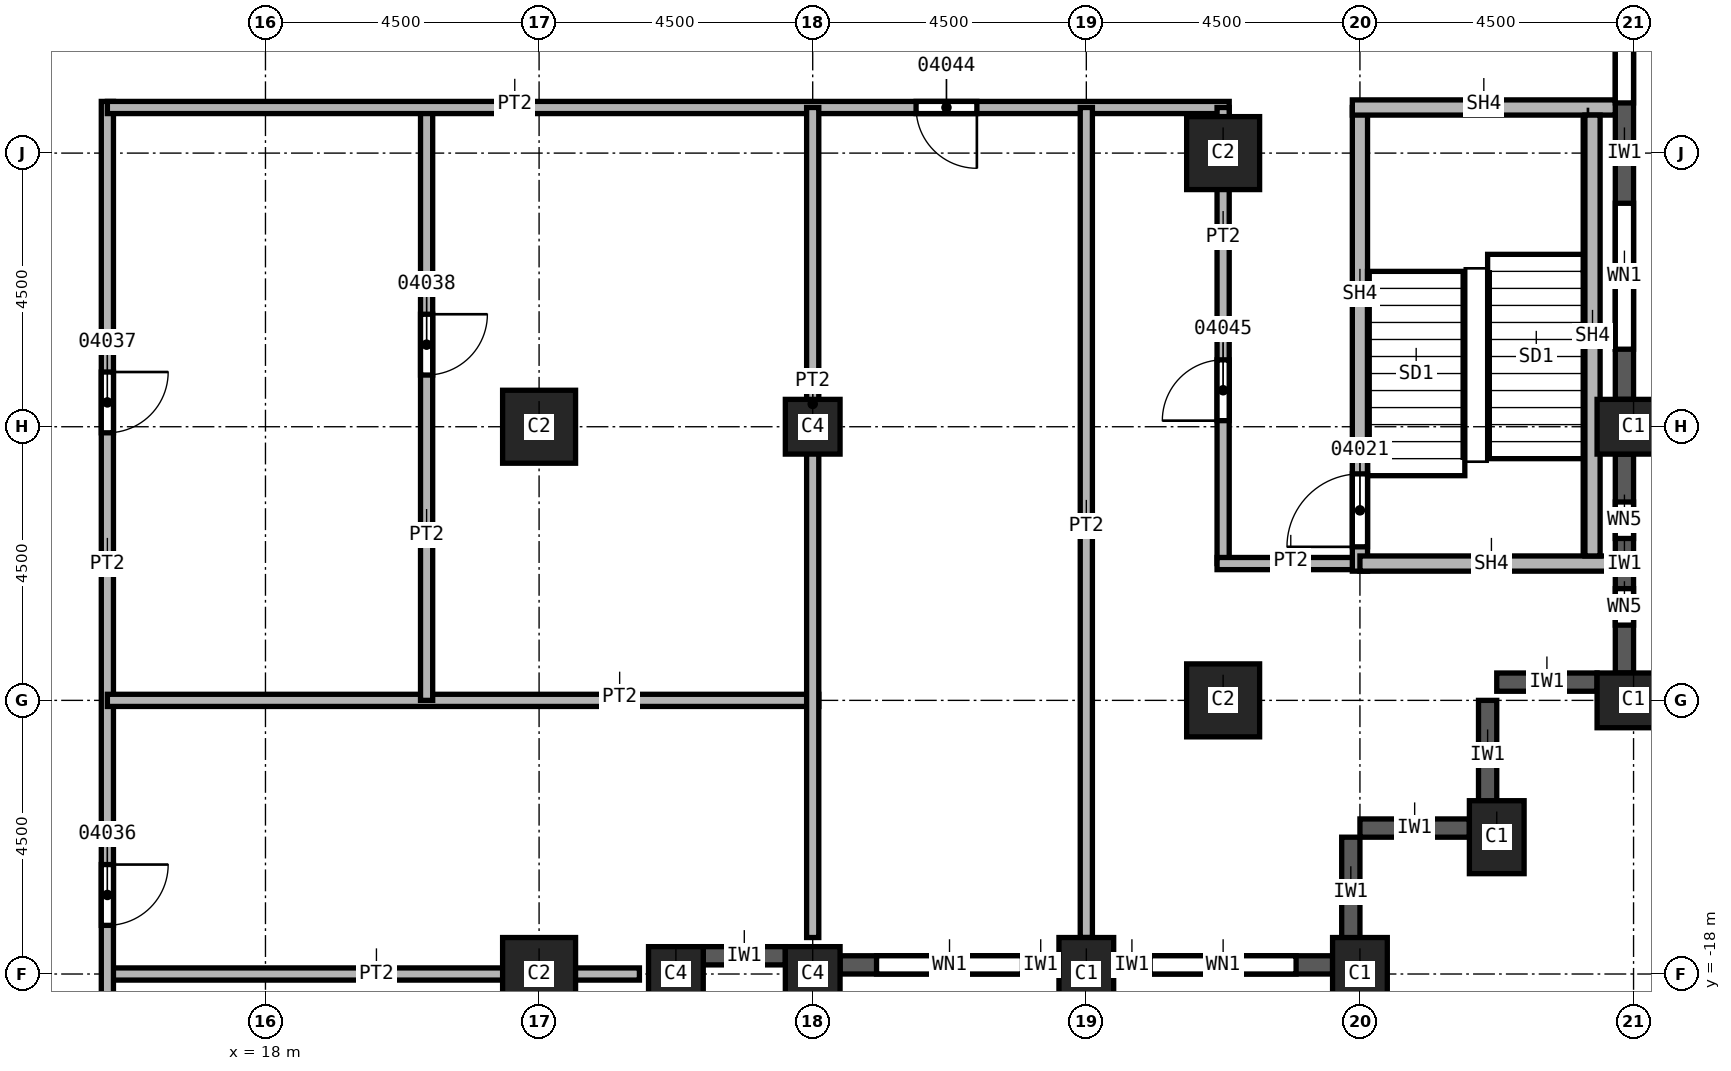
"""IFC4 building model, lengths in metres.
Left out: names, types, materials, properties, quantities, classifications, styles, units other than length and angle.
Written with IfcOpenShell. Run it as: python <this file> out.ifc"""

import sys

from ifc_helpers import new_model, si_unit, direction, frame, frame_2d, origin, origin_2d, place, context, subcontext, project, spatial, rectangle, extrude, element, fill, save


model = new_model("IFC4")
c1 = context("Model", 3, precision=1e-05, world=origin(), true_north=direction((0.0, 1.0)))
c2 = subcontext(c1, "Body", "Model", "MODEL_VIEW")
j1 = project(units=[si_unit("LENGTHUNIT", "METRE"), si_unit("PLANEANGLEUNIT", "RADIAN")], contexts=[c1])
p1 = place(None, origin())
s1 = spatial("IfcSite", under=j1, at=p1, CompositionType="ELEMENT")
p2 = place(p1, origin())
s2 = spatial("IfcBuilding", under=s1, at=p2, CompositionType="ELEMENT")
p3 = place(p2, frame((0.0, 0.0, 104.0)))
s3 = spatial("IfcBuildingStorey", under=s2, at=p3, CompositionType="ELEMENT", Elevation=104.0)
for number, where, z_axis, x_axis in (
    (1, (40.5, -9.0, 0.0), (0.0, 0.0, 1.0), (0.0, 1.0, 0.0)),
    (2, (40.5, -13.5, 0.0), (0.0, 0.0, 1.0), (0.0, 1.0, 0.0)),
    (3, (38.25, -15.75, 0.0), (0.0, 0.0, 1.0), (1.0, 0.0, 0.0)),
    (4, (31.5, -18.0, 0.0), (0.0, 0.0, 1.0), (1.0, 0.0, 0.0)),
    (5, (36.0, -18.0, 0.0), (0.0, 0.0, 1.0), (1.0, 0.0, 0.0)),
):
    element("IfcColumn", number, at=place(p3, frame(where, z_axis=z_axis, x_axis=x_axis)), inside=s3, PredefinedType="COLUMN", context=c2, shape_type="SweptSolid", body=[
        extrude(rectangle(XDim=0.9, YDim=1.2, at=origin_2d()), origin(), (0.0, 0.0, 1.0), 3.7),
    ])
for number, where, z_axis, x_axis in (
    (6, (33.75, -4.5, 0.0), (0.0, 0.0, 1.0), (1.0, 0.0, 0.0)),
    (7, (33.75, -13.5, 0.0), (0.0, 0.0, 1.0), (1.0, 0.0, 0.0)),
    (8, (22.5, -9.0, 0.0), (0.0, 0.0, 1.0), (1.0, 0.0, 0.0)),
    (9, (22.5, -18.0, 0.0), (0.0, 0.0, 1.0), (1.0, 0.0, 0.0)),
):
    element("IfcColumn", number, at=place(p3, frame(where, z_axis=z_axis, x_axis=x_axis)), inside=s3, PredefinedType="COLUMN", context=c2, shape_type="SweptSolid", body=[
        extrude(rectangle(XDim=1.2, YDim=1.2, at=origin_2d()), origin(), (0.0, 0.0, 1.0), 3.7),
    ])
for number, where, z_axis, x_axis in (
    (10, (27.0, -9.0, 0.0), (0.0, 0.0, 1.0), (1.0, 0.0, 0.0)),
    (11, (27.0, -18.0, 0.0), (0.0, 0.0, 1.0), (1.0, 0.0, 0.0)),
    (12, (24.75, -18.0, 0.0), (0.0, 0.0, 1.0), (1.0, 0.0, 0.0)),
):
    element("IfcColumn", number, at=place(p3, frame(where, z_axis=z_axis, x_axis=x_axis)), inside=s3, PredefinedType="COLUMN", context=c2, shape_type="SweptSolid", body=[
        extrude(rectangle(XDim=0.9, YDim=0.9, at=origin_2d()), origin(), (0.0, 0.0, 1.0), 3.7),
    ])
for number, where, z_axis, x_axis in (
    (13, (35.85, -17.55, 0.0), (0.0, 0.0, 1.0), (0.0, 1.0, 0.0)),
    (14, (37.8, -15.6, 0.0), (0.0, 0.0, 1.0), (-1.0, 0.0, 0.0)),
    (15, (38.1, -15.3, 0.0), (0.0, 0.0, 1.0), (0.0, 1.0, 0.0)),
):
    element("IfcWall", number, at=place(p3, frame(where, z_axis=z_axis, x_axis=x_axis)), inside=s3, PredefinedType="SOLIDWALL", context=c2, shape_type="SweptSolid", body=[
        extrude(rectangle(XDim=1.8, YDim=0.3, at=frame_2d((0.9, 0.0))), origin(), (0.0, 0.0, 1.0), 3.1),
    ])
p4 = place(p3, frame((39.9, -13.2, 0.0), z_axis=(0.0, 0.0, 1.0), x_axis=(-1.0, 0.0, 0.0)))
e16 = element("IfcWall", 16, at=p4, inside=s3, PredefinedType="SOLIDWALL", context=c2, shape_type="SweptSolid", body=[
    extrude(rectangle(XDim=1.65, YDim=0.3, at=frame_2d((0.825, 0.0))), origin(), (0.0, 0.0, 1.0), 3.1),
])
p5 = place(p3, frame((25.2, -17.7, 0.0), z_axis=(0.0, 0.0, 1.0), x_axis=(1.0, 0.0, 0.0)))
e17 = element("IfcWall", 17, at=p5, inside=s3, PredefinedType="SOLIDWALL", context=c2, shape_type="SweptSolid", body=[
    extrude(rectangle(XDim=1.35, YDim=0.3, at=frame_2d((0.675, 0.0))), origin(), (0.0, 0.0, 1.0), 3.1),
])
p6 = place(p3, frame((27.45, -17.85, 0.0), z_axis=(0.0, 0.0, 1.0), x_axis=(1.0, 0.0, 0.0)))
e18 = element("IfcWall", 18, at=p6, inside=s3, PredefinedType="SOLIDWALL", context=c2, shape_type="SweptSolid", body=[
    extrude(rectangle(XDim=3.6, YDim=0.3, at=frame_2d((1.8, 0.0))), origin(), (0.0, 0.0, 1.0), 3.1),
])
p7 = place(p6, frame((0.6, 0.0, 0.8)))
e19 = element("IfcOpeningElement", 19, at=p7, cuts=e18, PredefinedType="OPENING", context=c2, shape_type="SweptSolid", body=[
    extrude(rectangle(XDim=2.4, YDim=1.95, at=frame_2d((1.2, 0.975))), frame((0.0, 0.15, 0.0), z_axis=(0.0, -1.0, 0.0), x_axis=(1.0, 0.0, 0.0)), (0.0, 0.0, 1.0), 0.3),
])
p8 = place(p3, frame((31.95, -17.85, 0.0), z_axis=(0.0, 0.0, 1.0), x_axis=(1.0, 0.0, 0.0)))
e20 = element("IfcWall", 20, at=p8, inside=s3, PredefinedType="SOLIDWALL", context=c2, shape_type="SweptSolid", body=[
    extrude(rectangle(XDim=3.6, YDim=0.3, at=frame_2d((1.8, 0.0))), origin(), (0.0, 0.0, 1.0), 3.1),
])
p9 = place(p8, frame((0.6, 0.0, 0.8)))
e21 = element("IfcOpeningElement", 21, at=p9, cuts=e20, PredefinedType="OPENING", context=c2, shape_type="SweptSolid", body=[
    extrude(rectangle(XDim=2.4, YDim=1.95, at=frame_2d((1.2, 0.975))), frame((0.0, 0.15, 0.0), z_axis=(0.0, -1.0, 0.0), x_axis=(1.0, 0.0, 0.0)), (0.0, 0.0, 1.0), 0.3),
])
p10 = place(p3, frame((40.35, -13.05, 0.0), z_axis=(0.0, 0.0, 1.0), x_axis=(0.0, 1.0, 0.0)))
e22 = element("IfcWall", 22, at=p10, inside=s3, PredefinedType="SOLIDWALL", context=c2, shape_type="SweptSolid", body=[
    extrude(rectangle(XDim=3.6, YDim=0.3, at=frame_2d((1.8, 0.0))), origin(), (0.0, 0.0, 1.0), 3.1),
])
p11 = place(p10, frame((0.788, 0.0, 0.8)))
e23 = element("IfcOpeningElement", 23, at=p11, cuts=e22, PredefinedType="OPENING", context=c2, shape_type="SweptSolid", body=[
    extrude(rectangle(XDim=0.6, YDim=1.95, at=frame_2d((0.3, 0.975))), frame((0.0, 0.15, 0.0), z_axis=(0.0, -1.0, 0.0), x_axis=(1.0, 0.0, 0.0)), (0.0, 0.0, 1.0), 0.3),
])
p12 = place(p10, frame((2.212, 0.0, 0.8)))
e24 = element("IfcOpeningElement", 24, at=p12, cuts=e22, PredefinedType="OPENING", context=c2, shape_type="SweptSolid", body=[
    extrude(rectangle(XDim=0.6, YDim=1.95, at=frame_2d((0.3, 0.975))), frame((0.0, 0.15, 0.0), z_axis=(0.0, -1.0, 0.0), x_axis=(1.0, 0.0, 0.0)), (0.0, 0.0, 1.0), 0.3),
])
p13 = place(p3, frame((40.35, -8.55, 0.0), z_axis=(0.0, 0.0, 1.0), x_axis=(0.0, 1.0, 0.0)))
e25 = element("IfcWall", 25, at=p13, inside=s3, PredefinedType="SOLIDWALL", context=c2, shape_type="SweptSolid", body=[
    extrude(rectangle(XDim=8.1, YDim=0.3, at=frame_2d((4.05, 0.0))), origin(), (0.0, 0.0, 1.0), 3.1),
])
p14 = place(p13, frame((0.825, 0.0, 0.8)))
e26 = element("IfcOpeningElement", 26, at=p14, cuts=e25, PredefinedType="OPENING", context=c2, shape_type="SweptSolid", body=[
    extrude(rectangle(XDim=2.4, YDim=1.95, at=frame_2d((1.2, 0.975))), frame((0.0, 0.15, 0.0), z_axis=(0.0, -1.0, 0.0), x_axis=(1.0, 0.0, 0.0)), (0.0, 0.0, 1.0), 0.3),
])
p15 = place(p13, frame((4.875, 0.0, 0.8)))
e27 = element("IfcOpeningElement", 27, at=p15, cuts=e25, PredefinedType="OPENING", context=c2, shape_type="SweptSolid", body=[
    extrude(rectangle(XDim=2.4, YDim=1.95, at=frame_2d((1.2, 0.975))), frame((0.0, 0.15, 0.0), z_axis=(0.0, -1.0, 0.0), x_axis=(1.0, 0.0, 0.0)), (0.0, 0.0, 1.0), 0.3),
])
p16 = place(p3, frame((15.4, -18.0, 0.0), z_axis=(0.0, 0.0, 1.0), x_axis=(1.0, 0.0, 0.0)))
e28 = element("IfcWall", 28, at=p16, inside=s3, PredefinedType="PARTITIONING", context=c2, shape_type="SweptSolid", body=[
    extrude(rectangle(XDim=8.75, YDim=0.2, at=frame_2d((4.375, 0.0))), origin(), (0.0, 0.0, 1.0), 3.7),
])
p17 = place(p3, frame((15.4, -3.65, 0.0), z_axis=(0.0, 0.0, 1.0), x_axis=(0.0, -1.0, 0.0)))
e29 = element("IfcWall", 29, at=p17, inside=s3, PredefinedType="PARTITIONING", context=c2, shape_type="SweptSolid", body=[
    extrude(rectangle(XDim=20.85, YDim=0.2, at=frame_2d((10.425, 0.0))), origin(), (0.0, 0.0, 1.0), 3.7),
])
p18 = place(p17, frame((18.85, 0.0, 0.0)))
e30 = element("IfcOpeningElement", 30, at=p18, cuts=e29, PredefinedType="OPENING", context=c2, shape_type="SweptSolid", body=[
    extrude(rectangle(XDim=1.0, YDim=2.1, at=frame_2d((0.5, 1.05))), frame((0.0, 0.1, 0.0), z_axis=(0.0, -1.0, 0.0), x_axis=(1.0, 0.0, 0.0)), (0.0, 0.0, 1.0), 0.2),
])
p19 = place(p17, frame((12.55, 0.0, 0.0)))
e31 = element("IfcOpeningElement", 31, at=p19, cuts=e29, PredefinedType="OPENING", context=c2, shape_type="SweptSolid", body=[
    extrude(rectangle(XDim=1.0, YDim=2.1, at=frame_2d((0.5, 1.05))), frame((0.0, 0.1, 0.0), z_axis=(0.0, -1.0, 0.0), x_axis=(1.0, 0.0, 0.0)), (0.0, 0.0, 1.0), 0.2),
])
p20 = place(p17, frame((4.45, 0.0, 0.0)))
e32 = element("IfcOpeningElement", 32, at=p20, cuts=e29, PredefinedType="OPENING", context=c2, shape_type="SweptSolid", body=[
    extrude(rectangle(XDim=1.0, YDim=2.1, at=frame_2d((0.5, 1.05))), frame((0.0, 0.1, 0.0), z_axis=(0.0, -1.0, 0.0), x_axis=(1.0, 0.0, 0.0)), (0.0, 0.0, 1.0), 0.2),
])
p21 = place(p3, frame((15.4, -13.5, 0.0), z_axis=(0.0, 0.0, 1.0), x_axis=(1.0, 0.0, 0.0)))
e33 = element("IfcWall", 33, at=p21, inside=s3, PredefinedType="PARTITIONING", context=c2, shape_type="SweptSolid", body=[
    extrude(rectangle(XDim=11.7, YDim=0.2, at=frame_2d((5.85, 0.0))), origin(), (0.0, 0.0, 1.0), 3.7),
])
p22 = place(p3, frame((20.65, -3.75, 0.0), z_axis=(0.0, 0.0, 1.0), x_axis=(0.0, -1.0, 0.0)))
e34 = element("IfcWall", 34, at=p22, inside=s3, PredefinedType="PARTITIONING", context=c2, shape_type="SweptSolid", body=[
    extrude(rectangle(XDim=9.75, YDim=0.2, at=frame_2d((4.875, 0.0))), origin(), (0.0, 0.0, 1.0), 3.7),
])
p23 = place(p22, frame((3.4, 0.0, 0.0)))
e35 = element("IfcOpeningElement", 35, at=p23, cuts=e34, PredefinedType="OPENING", context=c2, shape_type="SweptSolid", body=[
    extrude(rectangle(XDim=1.0, YDim=2.1, at=frame_2d((0.5, 1.05))), frame((0.0, 0.1, 0.0), z_axis=(0.0, -1.0, 0.0), x_axis=(1.0, 0.0, 0.0)), (0.0, 0.0, 1.0), 0.2),
])
p24 = place(p3, frame((33.85, -3.75, 0.0), z_axis=(0.0, 0.0, 1.0), x_axis=(-1.0, 0.0, 0.0)))
e36 = element("IfcWall", 36, at=p24, inside=s3, PredefinedType="PARTITIONING", context=c2, shape_type="SweptSolid", body=[
    extrude(rectangle(XDim=18.45, YDim=0.2, at=frame_2d((9.225, 0.0))), origin(), (0.0, 0.0, 1.0), 3.7),
])
p25 = place(p24, frame((4.15, 0.0, 0.0)))
e37 = element("IfcOpeningElement", 37, at=p25, cuts=e36, PredefinedType="OPENING", context=c2, shape_type="SweptSolid", body=[
    extrude(rectangle(XDim=1.0, YDim=2.1, at=frame_2d((0.5, 1.05))), frame((0.0, 0.1, 0.0), z_axis=(0.0, -1.0, 0.0), x_axis=(1.0, 0.0, 0.0)), (0.0, 0.0, 1.0), 0.2),
])
for number, where, z_axis, x_axis in (
    (38, (27.0, -3.75, 0.0), (0.0, 0.0, 1.0), (0.0, -1.0, 0.0)),
    (39, (31.5, -3.75, 0.0), (0.0, 0.0, 1.0), (0.0, -1.0, 0.0)),
):
    element("IfcWall", number, at=place(p3, frame(where, z_axis=z_axis, x_axis=x_axis)), inside=s3, PredefinedType="PARTITIONING", context=c2, shape_type="SweptSolid", body=[
        extrude(rectangle(XDim=13.65, YDim=0.2, at=frame_2d((6.825, 0.0))), origin(), (0.0, 0.0, 1.0), 3.7),
    ])
p26 = place(p3, frame((33.75, -11.25, 0.0), z_axis=(0.0, 0.0, 1.0), x_axis=(0.0, 1.0, 0.0)))
e40 = element("IfcWall", 40, at=p26, inside=s3, PredefinedType="PARTITIONING", context=c2, shape_type="SweptSolid", body=[
    extrude(rectangle(XDim=7.5, YDim=0.2, at=frame_2d((3.75, 0.0))), origin(), (0.0, 0.0, 1.0), 3.7),
])
p27 = place(p26, frame((2.35, 0.0, 0.0)))
e41 = element("IfcOpeningElement", 41, at=p27, cuts=e40, PredefinedType="OPENING", context=c2, shape_type="SweptSolid", body=[
    extrude(rectangle(XDim=1.0, YDim=2.1, at=frame_2d((0.5, 1.05))), frame((0.0, 0.1, 0.0), z_axis=(0.0, -1.0, 0.0), x_axis=(1.0, 0.0, 0.0)), (0.0, 0.0, 1.0), 0.2),
])
p28 = place(p3, frame((36.0, -11.25, 0.0), z_axis=(0.0, 0.0, 1.0), x_axis=(-1.0, 0.0, 0.0)))
e42 = element("IfcWall", 42, at=p28, inside=s3, PredefinedType="PARTITIONING", context=c2, shape_type="SweptSolid", body=[
    extrude(rectangle(XDim=2.35, YDim=0.2, at=frame_2d((1.175, 0.0))), origin(), (0.0, 0.0, 1.0), 3.7),
])
p29 = place(p3, frame((36.0, -11.375, 0.0), z_axis=(0.0, 0.0, 1.0), x_axis=(0.0, 1.0, 0.0)))
e43 = element("IfcWall", 43, at=p29, inside=s3, PredefinedType="SOLIDWALL", context=c2, shape_type="SweptSolid", body=[
    extrude(rectangle(XDim=7.625, YDim=0.25, at=frame_2d((3.812, 0.0))), origin(), (0.0, 0.0, 1.0), 3.7),
])
p30 = place(p29, frame((0.4, 0.0, 0.0)))
e44 = element("IfcOpeningElement", 44, at=p30, cuts=e43, PredefinedType="OPENING", context=c2, shape_type="SweptSolid", body=[
    extrude(rectangle(XDim=1.2, YDim=2.1, at=frame_2d((0.6, 1.05))), frame((0.0, 0.125, 0.0), z_axis=(0.0, -1.0, 0.0), x_axis=(1.0, 0.0, 0.0)), (0.0, 0.0, 1.0), 0.25),
])
p31 = place(p3, frame((40.2, -11.25, 0.0), z_axis=(0.0, 0.0, 1.0), x_axis=(-1.0, 0.0, 0.0)))
e45 = element("IfcWall", 45, at=p31, inside=s3, PredefinedType="SOLIDWALL", context=c2, shape_type="SweptSolid", body=[
    extrude(rectangle(XDim=4.2, YDim=0.25, at=frame_2d((2.1, 0.0))), origin(), (0.0, 0.0, 1.0), 3.7),
])
p32 = place(p3, frame((40.2, -3.75, 0.0), z_axis=(0.0, 0.0, 1.0), x_axis=(-1.0, 0.0, 0.0)))
e46 = element("IfcWall", 46, at=p32, inside=s3, PredefinedType="SOLIDWALL", context=c2, shape_type="SweptSolid", body=[
    extrude(rectangle(XDim=4.325, YDim=0.25, at=frame_2d((2.163, 0.0))), origin(), (0.0, 0.0, 1.0), 3.7),
])
p33 = place(p3, frame((39.825, -11.125, 0.0), z_axis=(0.0, 0.0, 1.0), x_axis=(0.0, 1.0, 0.0)))
e47 = element("IfcWall", 47, at=p33, inside=s3, PredefinedType="SOLIDWALL", context=c2, shape_type="SweptSolid", body=[
    extrude(rectangle(XDim=7.25, YDim=0.25, at=frame_2d((3.625, 0.0))), origin(), (0.0, 0.0, 1.0), 3.7),
])
p34 = place(p7, origin())
e48 = element("IfcWindow", 48, at=p34, inside=s3, PartitioningType="SINGLE_PANEL", PredefinedType="WINDOW", context=c2, shape_type="SweptSolid", body=[
    extrude(rectangle(XDim=2.4, YDim=1.95, at=frame_2d((1.2, 0.975))), frame((0.0, 0.03, 0.0), z_axis=(0.0, -1.0, 0.0), x_axis=(1.0, 0.0, 0.0)), (0.0, 0.0, 1.0), 0.06),
])
fill(e19, e48)
p35 = place(p9, origin())
e49 = element("IfcWindow", 49, at=p35, inside=s3, PartitioningType="SINGLE_PANEL", PredefinedType="WINDOW", context=c2, shape_type="SweptSolid", body=[
    extrude(rectangle(XDim=2.4, YDim=1.95, at=frame_2d((1.2, 0.975))), frame((0.0, 0.03, 0.0), z_axis=(0.0, -1.0, 0.0), x_axis=(1.0, 0.0, 0.0)), (0.0, 0.0, 1.0), 0.06),
])
fill(e21, e49)
p36 = place(p14, origin())
e50 = element("IfcWindow", 50, at=p36, inside=s3, PartitioningType="SINGLE_PANEL", PredefinedType="WINDOW", context=c2, shape_type="SweptSolid", body=[
    extrude(rectangle(XDim=2.4, YDim=1.95, at=frame_2d((1.2, 0.975))), frame((0.0, 0.03, 0.0), z_axis=(0.0, -1.0, 0.0), x_axis=(1.0, 0.0, 0.0)), (0.0, 0.0, 1.0), 0.06),
])
fill(e26, e50)
p37 = place(p15, origin())
e51 = element("IfcWindow", 51, at=p37, inside=s3, PartitioningType="SINGLE_PANEL", PredefinedType="WINDOW", context=c2, shape_type="SweptSolid", body=[
    extrude(rectangle(XDim=2.4, YDim=1.95, at=frame_2d((1.2, 0.975))), frame((0.0, 0.03, 0.0), z_axis=(0.0, -1.0, 0.0), x_axis=(1.0, 0.0, 0.0)), (0.0, 0.0, 1.0), 0.06),
])
fill(e27, e51)
p38 = place(p30, origin())
e52 = element("IfcDoor", 52, at=p38, inside=s3, OperationType="SINGLE_SWING_RIGHT", PredefinedType="DOOR", context=c2, shape_type="SweptSolid", body=[
    extrude(rectangle(XDim=1.2, YDim=2.1, at=frame_2d((0.6, 1.05))), frame((0.0, 0.025, 0.0), z_axis=(0.0, -1.0, 0.0), x_axis=(1.0, 0.0, 0.0)), (0.0, 0.0, 1.0), 0.05),
])
fill(e44, e52)
p39 = place(p19, origin())
e53 = element("IfcDoor", 53, at=p39, inside=s3, OperationType="SINGLE_SWING_LEFT", PredefinedType="DOOR", context=c2, shape_type="SweptSolid", body=[
    extrude(rectangle(XDim=1.0, YDim=2.1, at=frame_2d((0.5, 1.05))), frame((0.0, 0.025, 0.0), z_axis=(0.0, -1.0, 0.0), x_axis=(1.0, 0.0, 0.0)), (0.0, 0.0, 1.0), 0.05),
])
fill(e31, e53)
p40 = place(p20, origin())
e54 = element("IfcDoor", 54, at=p40, inside=s3, OperationType="SINGLE_SWING_RIGHT", PredefinedType="DOOR", context=c2, shape_type="SweptSolid", body=[
    extrude(rectangle(XDim=1.0, YDim=2.1, at=frame_2d((0.5, 1.05))), frame((0.0, 0.025, 0.0), z_axis=(0.0, -1.0, 0.0), x_axis=(1.0, 0.0, 0.0)), (0.0, 0.0, 1.0), 0.05),
])
fill(e32, e54)
p41 = place(p23, origin())
e55 = element("IfcDoor", 55, at=p41, inside=s3, OperationType="SINGLE_SWING_LEFT", PredefinedType="DOOR", context=c2, shape_type="SweptSolid", body=[
    extrude(rectangle(XDim=1.0, YDim=2.1, at=frame_2d((0.5, 1.05))), frame((0.0, 0.025, 0.0), z_axis=(0.0, -1.0, 0.0), x_axis=(1.0, 0.0, 0.0)), (0.0, 0.0, 1.0), 0.05),
])
fill(e35, e55)
p42 = place(p25, origin())
e56 = element("IfcDoor", 56, at=p42, inside=s3, OperationType="SINGLE_SWING_LEFT", PredefinedType="DOOR", context=c2, shape_type="SweptSolid", body=[
    extrude(rectangle(XDim=1.0, YDim=2.1, at=frame_2d((0.5, 1.05))), frame((0.0, 0.025, 0.0), z_axis=(0.0, -1.0, 0.0), x_axis=(1.0, 0.0, 0.0)), (0.0, 0.0, 1.0), 0.05),
])
fill(e37, e56)
p43 = place(p27, origin())
e57 = element("IfcDoor", 57, at=p43, inside=s3, OperationType="SINGLE_SWING_RIGHT", PredefinedType="DOOR", context=c2, shape_type="SweptSolid", body=[
    extrude(rectangle(XDim=1.0, YDim=2.1, at=frame_2d((0.5, 1.05))), frame((0.0, 0.025, 0.0), z_axis=(0.0, -1.0, 0.0), x_axis=(1.0, 0.0, 0.0)), (0.0, 0.0, 1.0), 0.05),
])
fill(e41, e57)
p44 = place(p11, origin())
e58 = element("IfcWindow", 58, at=p44, inside=s3, PartitioningType="SINGLE_PANEL", PredefinedType="WINDOW", context=c2, shape_type="SweptSolid", body=[
    extrude(rectangle(XDim=0.6, YDim=1.95, at=frame_2d((0.3, 0.975))), frame((0.0, 0.03, 0.0), z_axis=(0.0, -1.0, 0.0), x_axis=(1.0, 0.0, 0.0)), (0.0, 0.0, 1.0), 0.06),
])
fill(e23, e58)
p45 = place(p12, origin())
e59 = element("IfcWindow", 59, at=p45, inside=s3, PartitioningType="SINGLE_PANEL", PredefinedType="WINDOW", context=c2, shape_type="SweptSolid", body=[
    extrude(rectangle(XDim=0.6, YDim=1.95, at=frame_2d((0.3, 0.975))), frame((0.0, 0.03, 0.0), z_axis=(0.0, -1.0, 0.0), x_axis=(1.0, 0.0, 0.0)), (0.0, 0.0, 1.0), 0.06),
])
fill(e24, e59)
save(model, sys.argv[1])
